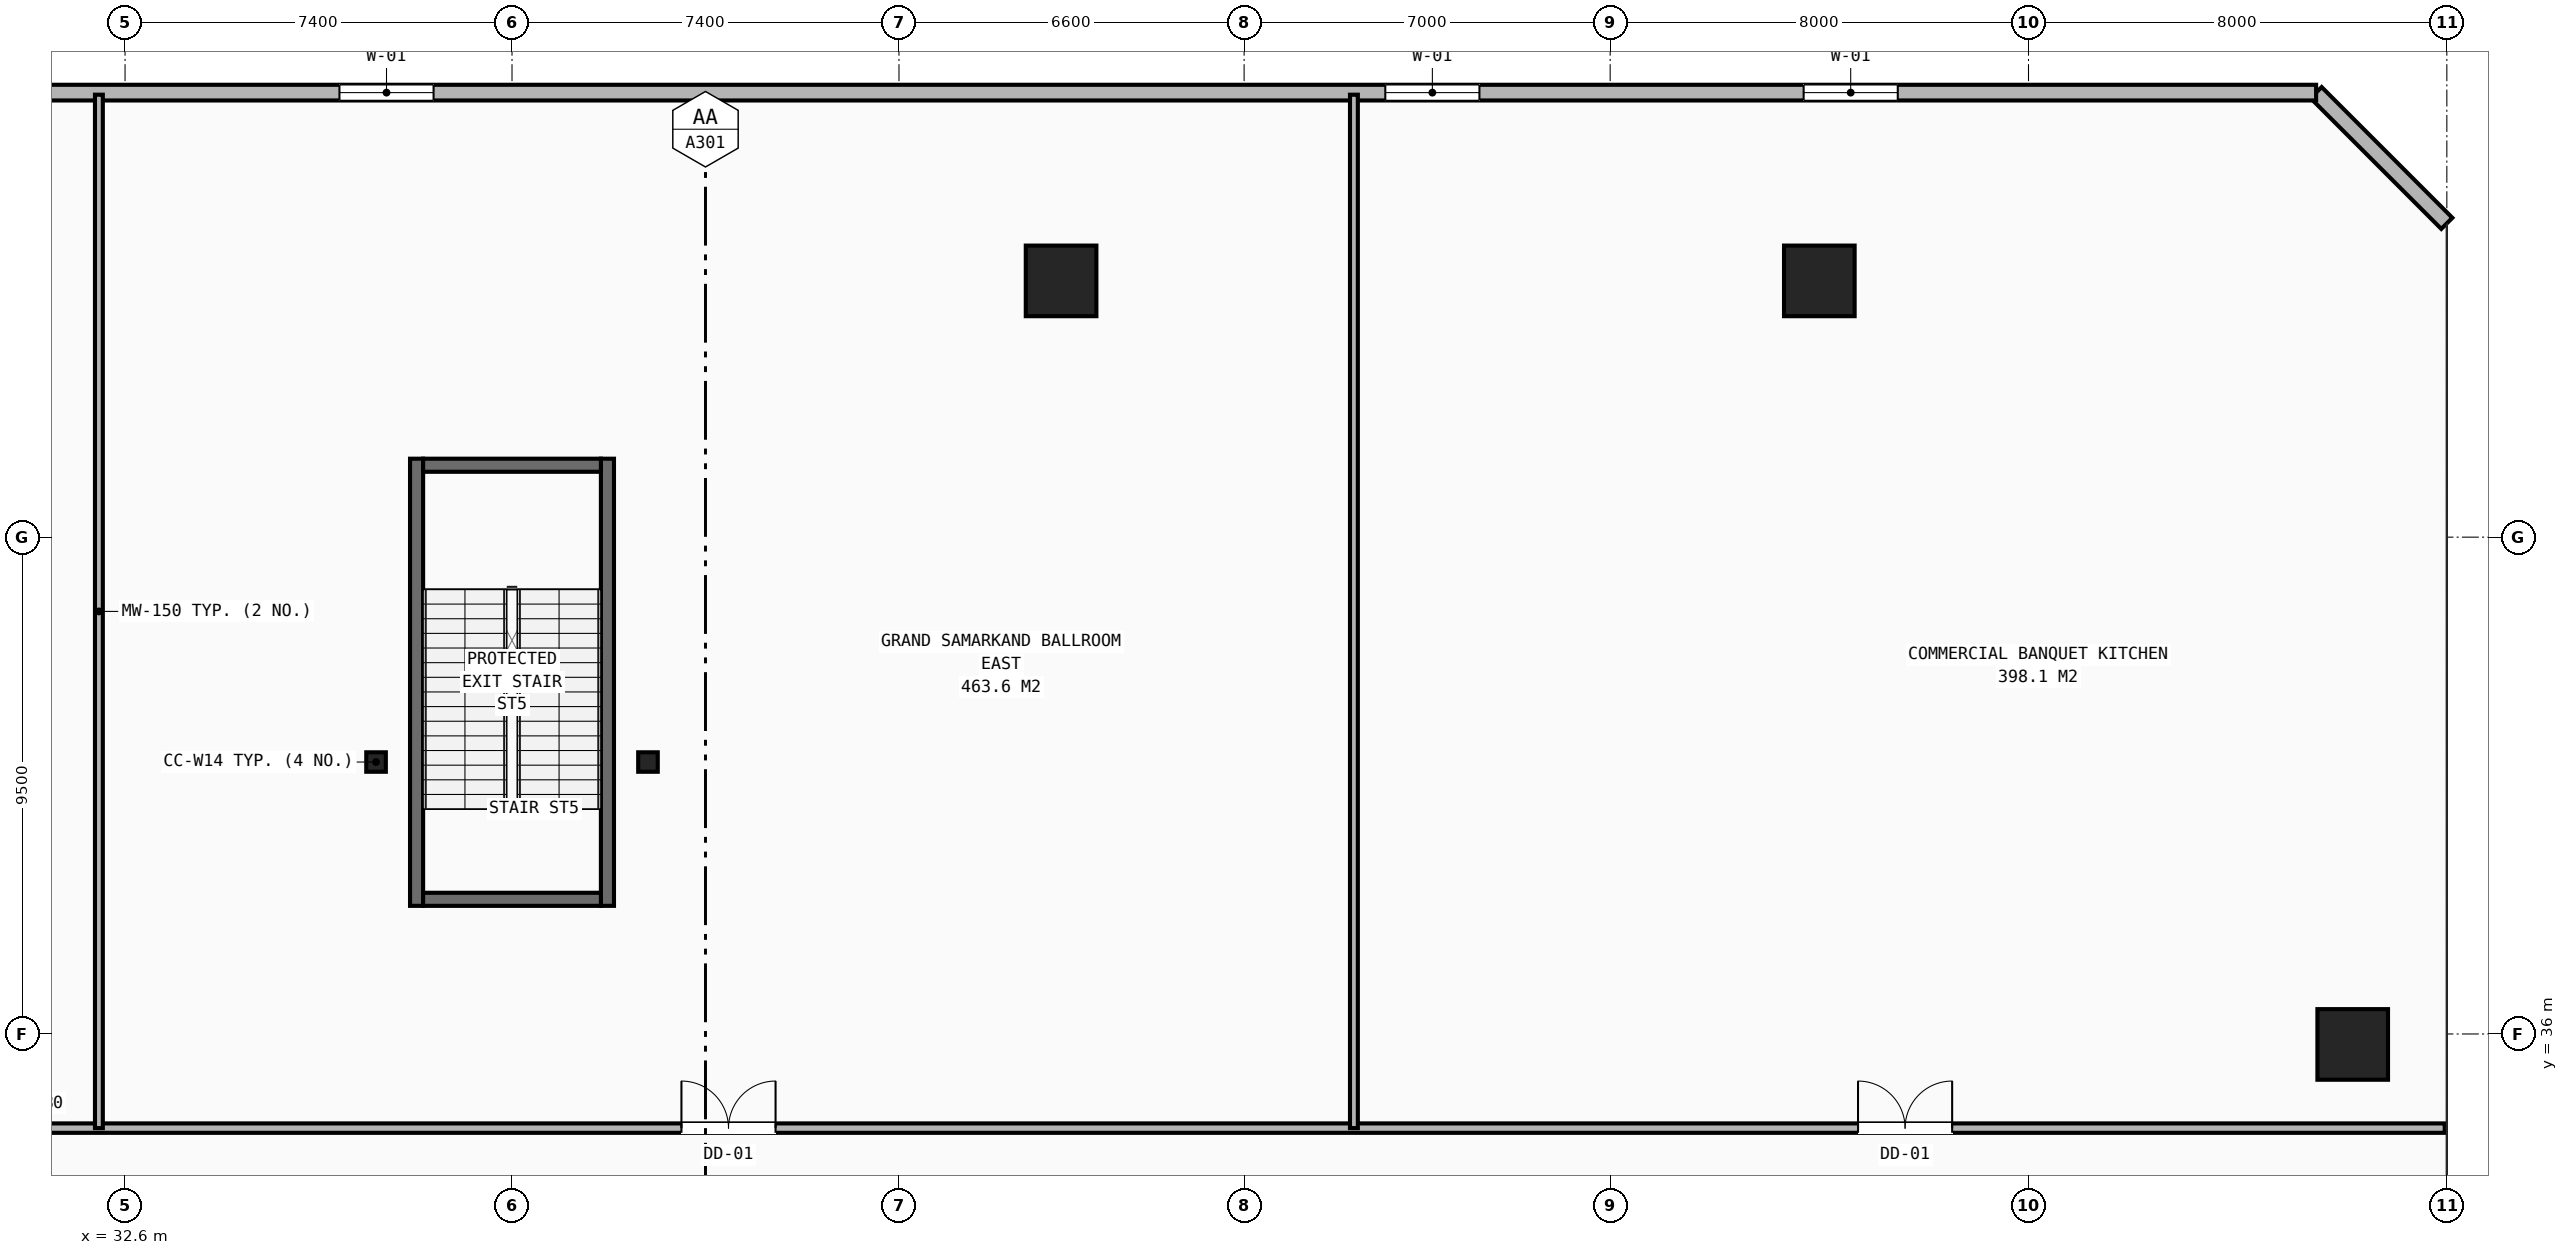
"""IFC4 building model, lengths in metres.
Left out: names, types, materials, properties, quantities, classifications, styles, units other than length and angle.
Written with IfcOpenShell. Run it as: python <this file> out.ifc"""

import sys

from ifc_helpers import new_model, si_unit, direction, frame, frame_2d, origin, origin_2d, place, context, subcontext, project, spatial, rectangle, hollow_rectangle, i_section, extrude, element, fill, save


model = new_model("IFC4")
c1 = context("Model", 3, precision=1e-05, world=origin(), true_north=direction((0.0, 1.0)))
c2 = subcontext(c1, "Body", "Model", "MODEL_VIEW")
j1 = project(units=[si_unit("LENGTHUNIT", "METRE"), si_unit("PLANEANGLEUNIT", "RADIAN")], contexts=[c1])
p1 = place(None, origin())
s1 = spatial("IfcSite", under=j1, at=p1, CompositionType="ELEMENT")
p2 = place(p1, origin())
s2 = spatial("IfcBuilding", under=s1, at=p2, CompositionType="ELEMENT")
p3 = place(p2, frame((0.0, 0.0, 16.5)))
s3 = spatial("IfcBuildingStorey", under=s2, at=p3, CompositionType="ELEMENT", Elevation=16.5)
for number, where, z_axis, x_axis in (
    (1, (37.4, 41.2, 0.0), (0.0, 0.0, 1.0), (1.0, 0.0, 0.0)),
    (2, (42.6, 41.2, 0.0), (0.0, 0.0, 1.0), (1.0, 0.0, 0.0)),
):
    element("IfcColumn", number, at=place(p3, frame(where, z_axis=z_axis, x_axis=x_axis)), inside=s3, PredefinedType="COLUMN", context=c2, shape_type="SweptSolid", body=[
        extrude(i_section(OverallWidth=0.374, OverallDepth=0.372, WebThickness=0.016, FlangeThickness=0.026, at=origin_2d()), origin(), (0.0, 0.0, 1.0), 5.5),
    ])
for number, where, z_axis, x_axis in (
    (3, (75.2, 35.8, 0.0), (0.0, 0.0, 1.0), (1.0, 0.0, 0.0)),
    (4, (50.5, 50.4, 0.0), (0.0, 0.0, 1.0), (1.0, 0.0, 0.0)),
    (5, (65.0, 50.4, 0.0), (0.0, 0.0, 1.0), (1.0, 0.0, 0.0)),
):
    element("IfcColumn", number, at=place(p3, frame(where, z_axis=z_axis, x_axis=x_axis)), inside=s3, PredefinedType="COLUMN", context=c2, shape_type="SweptSolid", body=[
        extrude(hollow_rectangle(XDim=1.35, YDim=1.35, WallThickness=0.085, at=origin_2d()), origin(), (0.0, 0.0, 1.0), 5.5),
    ])
p4 = place(p3, frame((77.0, 51.5, 0.0), z_axis=(0.0, 0.0, 1.0), x_axis=(-0.707106781187, 0.707106781187, 0.0)))
e6 = element("IfcWall", 6, at=p4, inside=s3, PredefinedType="STANDARD", context=c2, shape_type="SweptSolid", body=[
    extrude(rectangle(XDim=3.536, YDim=0.3, at=frame_2d((1.768, 0.0))), origin(), (0.0, 0.0, 1.0), 5.18),
])
p5 = place(p3, frame((74.5, 54.0, 0.0), z_axis=(0.0, 0.0, 1.0), x_axis=(-1.0, 0.0, 0.0)))
e7 = element("IfcWall", 7, at=p5, inside=s3, PredefinedType="STANDARD", context=c2, shape_type="SweptSolid", body=[
    extrude(rectangle(XDim=69.0, YDim=0.3, at=frame_2d((34.5, 0.0))), origin(), (0.0, 0.0, 1.0), 5.18),
])
p6 = place(p5, frame((8.0, 0.0, 1.1)))
e8 = element("IfcOpeningElement", 8, at=p6, cuts=e7, PredefinedType="OPENING", context=c2, shape_type="SweptSolid", body=[
    extrude(rectangle(XDim=1.8, YDim=2.1, at=frame_2d((0.9, 1.05))), frame((0.0, 0.16, 0.0), z_axis=(0.0, -1.0, 0.0), x_axis=(1.0, 0.0, 0.0)), (0.0, 0.0, 1.0), 0.32),
])
p7 = place(p5, frame((16.0, 0.0, 1.1)))
e9 = element("IfcOpeningElement", 9, at=p7, cuts=e7, PredefinedType="OPENING", context=c2, shape_type="SweptSolid", body=[
    extrude(rectangle(XDim=1.8, YDim=2.1, at=frame_2d((0.9, 1.05))), frame((0.0, 0.16, 0.0), z_axis=(0.0, -1.0, 0.0), x_axis=(1.0, 0.0, 0.0)), (0.0, 0.0, 1.0), 0.32),
])
p8 = place(p5, frame((36.0, 0.0, 1.1)))
e10 = element("IfcOpeningElement", 10, at=p8, cuts=e7, PredefinedType="OPENING", context=c2, shape_type="SweptSolid", body=[
    extrude(rectangle(XDim=1.8, YDim=2.1, at=frame_2d((0.9, 1.05))), frame((0.0, 0.16, 0.0), z_axis=(0.0, -1.0, 0.0), x_axis=(1.0, 0.0, 0.0)), (0.0, 0.0, 1.0), 0.32),
])
p9 = place(p5, frame((60.0, 0.0, 1.1)))
e11 = element("IfcOpeningElement", 11, at=p9, cuts=e7, PredefinedType="OPENING", context=c2, shape_type="SweptSolid", body=[
    extrude(rectangle(XDim=1.8, YDim=2.1, at=frame_2d((0.9, 1.05))), frame((0.0, 0.16, 0.0), z_axis=(0.0, -1.0, 0.0), x_axis=(1.0, 0.0, 0.0)), (0.0, 0.0, 1.0), 0.32),
])
p10 = place(p3, frame((3.04, 34.2, 0.0), z_axis=(0.0, 0.0, 1.0), x_axis=(1.0, 0.0, 0.0)))
e12 = element("IfcWall", 12, at=p10, inside=s3, PredefinedType="PARTITIONING", context=c2, shape_type="SweptSolid", body=[
    extrude(rectangle(XDim=73.92, YDim=0.18, at=frame_2d((36.96, 0.0))), origin(), (0.0, 0.0, 1.0), 4.243),
])
p11 = place(p10, frame((13.6, 0.0, 0.0)))
e13 = element("IfcOpeningElement", 13, at=p11, cuts=e12, PredefinedType="OPENING", context=c2, shape_type="SweptSolid", body=[
    extrude(rectangle(XDim=1.8, YDim=2.4, at=frame_2d((0.9, 1.2))), frame((0.0, 0.1, 0.0), z_axis=(0.0, -1.0, 0.0), x_axis=(1.0, 0.0, 0.0)), (0.0, 0.0, 1.0), 0.2),
])
p12 = place(p10, frame((40.2, 0.0, 0.0)))
e14 = element("IfcOpeningElement", 14, at=p12, cuts=e12, PredefinedType="OPENING", context=c2, shape_type="SweptSolid", body=[
    extrude(rectangle(XDim=1.8, YDim=2.4, at=frame_2d((0.9, 1.2))), frame((0.0, 0.1, 0.0), z_axis=(0.0, -1.0, 0.0), x_axis=(1.0, 0.0, 0.0)), (0.0, 0.0, 1.0), 0.2),
])
p13 = place(p10, frame((62.7, 0.0, 0.0)))
e15 = element("IfcOpeningElement", 15, at=p13, cuts=e12, PredefinedType="OPENING", context=c2, shape_type="SweptSolid", body=[
    extrude(rectangle(XDim=1.8, YDim=2.4, at=frame_2d((0.9, 1.2))), frame((0.0, 0.1, 0.0), z_axis=(0.0, -1.0, 0.0), x_axis=(1.0, 0.0, 0.0)), (0.0, 0.0, 1.0), 0.2),
])
for number, where, z_axis, x_axis in (
    (16, (32.1, 34.2, 0.0), (0.0, 0.0, 1.0), (0.0, 1.0, 0.0)),
    (17, (56.1, 34.2, 0.0), (0.0, 0.0, 1.0), (0.0, 1.0, 0.0)),
):
    element("IfcWall", number, at=place(p3, frame(where, z_axis=z_axis, x_axis=x_axis)), inside=s3, PredefinedType="MOVABLE", context=c2, shape_type="SweptSolid", body=[
        extrude(rectangle(XDim=19.76, YDim=0.15, at=frame_2d((9.88, 0.0))), origin(), (0.0, 0.0, 1.0), 4.243),
    ])
for number, where, z_axis, x_axis in (
    (18, (38.175, 38.45, 0.0), (0.0, 0.0, 1.0), (0.0, 1.0, 0.0)),
    (19, (41.825, 38.45, 0.0), (0.0, 0.0, 1.0), (0.0, 1.0, 0.0)),
):
    element("IfcWall", number, at=place(p3, frame(where, z_axis=z_axis, x_axis=x_axis)), inside=s3, PredefinedType="SHEAR", context=c2, shape_type="SweptSolid", body=[
        extrude(rectangle(XDim=8.55, YDim=0.25, at=frame_2d((4.275, 0.0))), origin(), (0.0, 0.0, 1.0), 5.18),
    ])
for number, where, z_axis, x_axis in (
    (20, (38.3, 38.575, 0.0), (0.0, 0.0, 1.0), (1.0, 0.0, 0.0)),
    (21, (38.3, 46.875, 0.0), (0.0, 0.0, 1.0), (1.0, 0.0, 0.0)),
):
    element("IfcWall", number, at=place(p3, frame(where, z_axis=z_axis, x_axis=x_axis)), inside=s3, PredefinedType="SHEAR", context=c2, shape_type="SweptSolid", body=[
        extrude(rectangle(XDim=3.4, YDim=0.25, at=frame_2d((1.7, 0.0))), origin(), (0.0, 0.0, 1.0), 5.18),
    ])
p14 = place(p6, origin())
e22 = element("IfcWindow", 22, at=p14, inside=s3, PartitioningType="SINGLE_PANEL", PredefinedType="WINDOW", context=c2, shape_type="SweptSolid", body=[
    extrude(rectangle(XDim=1.8, YDim=2.1, at=frame_2d((0.9, 1.05))), frame((0.0, 0.03, 0.0), z_axis=(0.0, -1.0, 0.0), x_axis=(1.0, 0.0, 0.0)), (0.0, 0.0, 1.0), 0.06),
])
fill(e8, e22)
p15 = place(p7, origin())
e23 = element("IfcWindow", 23, at=p15, inside=s3, PartitioningType="SINGLE_PANEL", PredefinedType="WINDOW", context=c2, shape_type="SweptSolid", body=[
    extrude(rectangle(XDim=1.8, YDim=2.1, at=frame_2d((0.9, 1.05))), frame((0.0, 0.03, 0.0), z_axis=(0.0, -1.0, 0.0), x_axis=(1.0, 0.0, 0.0)), (0.0, 0.0, 1.0), 0.06),
])
fill(e9, e23)
p16 = place(p8, origin())
e24 = element("IfcWindow", 24, at=p16, inside=s3, PartitioningType="SINGLE_PANEL", PredefinedType="WINDOW", context=c2, shape_type="SweptSolid", body=[
    extrude(rectangle(XDim=1.8, YDim=2.1, at=frame_2d((0.9, 1.05))), frame((0.0, 0.03, 0.0), z_axis=(0.0, -1.0, 0.0), x_axis=(1.0, 0.0, 0.0)), (0.0, 0.0, 1.0), 0.06),
])
fill(e10, e24)
p17 = place(p12, origin())
e25 = element("IfcDoor", 25, at=p17, inside=s3, OperationType="DOUBLE_DOOR_SINGLE_SWING", PredefinedType="DOOR", context=c2, shape_type="SweptSolid", body=[
    extrude(rectangle(XDim=1.8, YDim=2.4, at=frame_2d((0.9, 1.2))), frame((0.0, 0.025, 0.0), z_axis=(0.0, -1.0, 0.0), x_axis=(1.0, 0.0, 0.0)), (0.0, 0.0, 1.0), 0.05),
])
fill(e14, e25)
p18 = place(p13, origin())
e26 = element("IfcDoor", 26, at=p18, inside=s3, OperationType="DOUBLE_DOOR_SINGLE_SWING", PredefinedType="DOOR", context=c2, shape_type="SweptSolid", body=[
    extrude(rectangle(XDim=1.8, YDim=2.4, at=frame_2d((0.9, 1.2))), frame((0.0, 0.025, 0.0), z_axis=(0.0, -1.0, 0.0), x_axis=(1.0, 0.0, 0.0)), (0.0, 0.0, 1.0), 0.05),
])
fill(e15, e26)
save(model, sys.argv[1])
